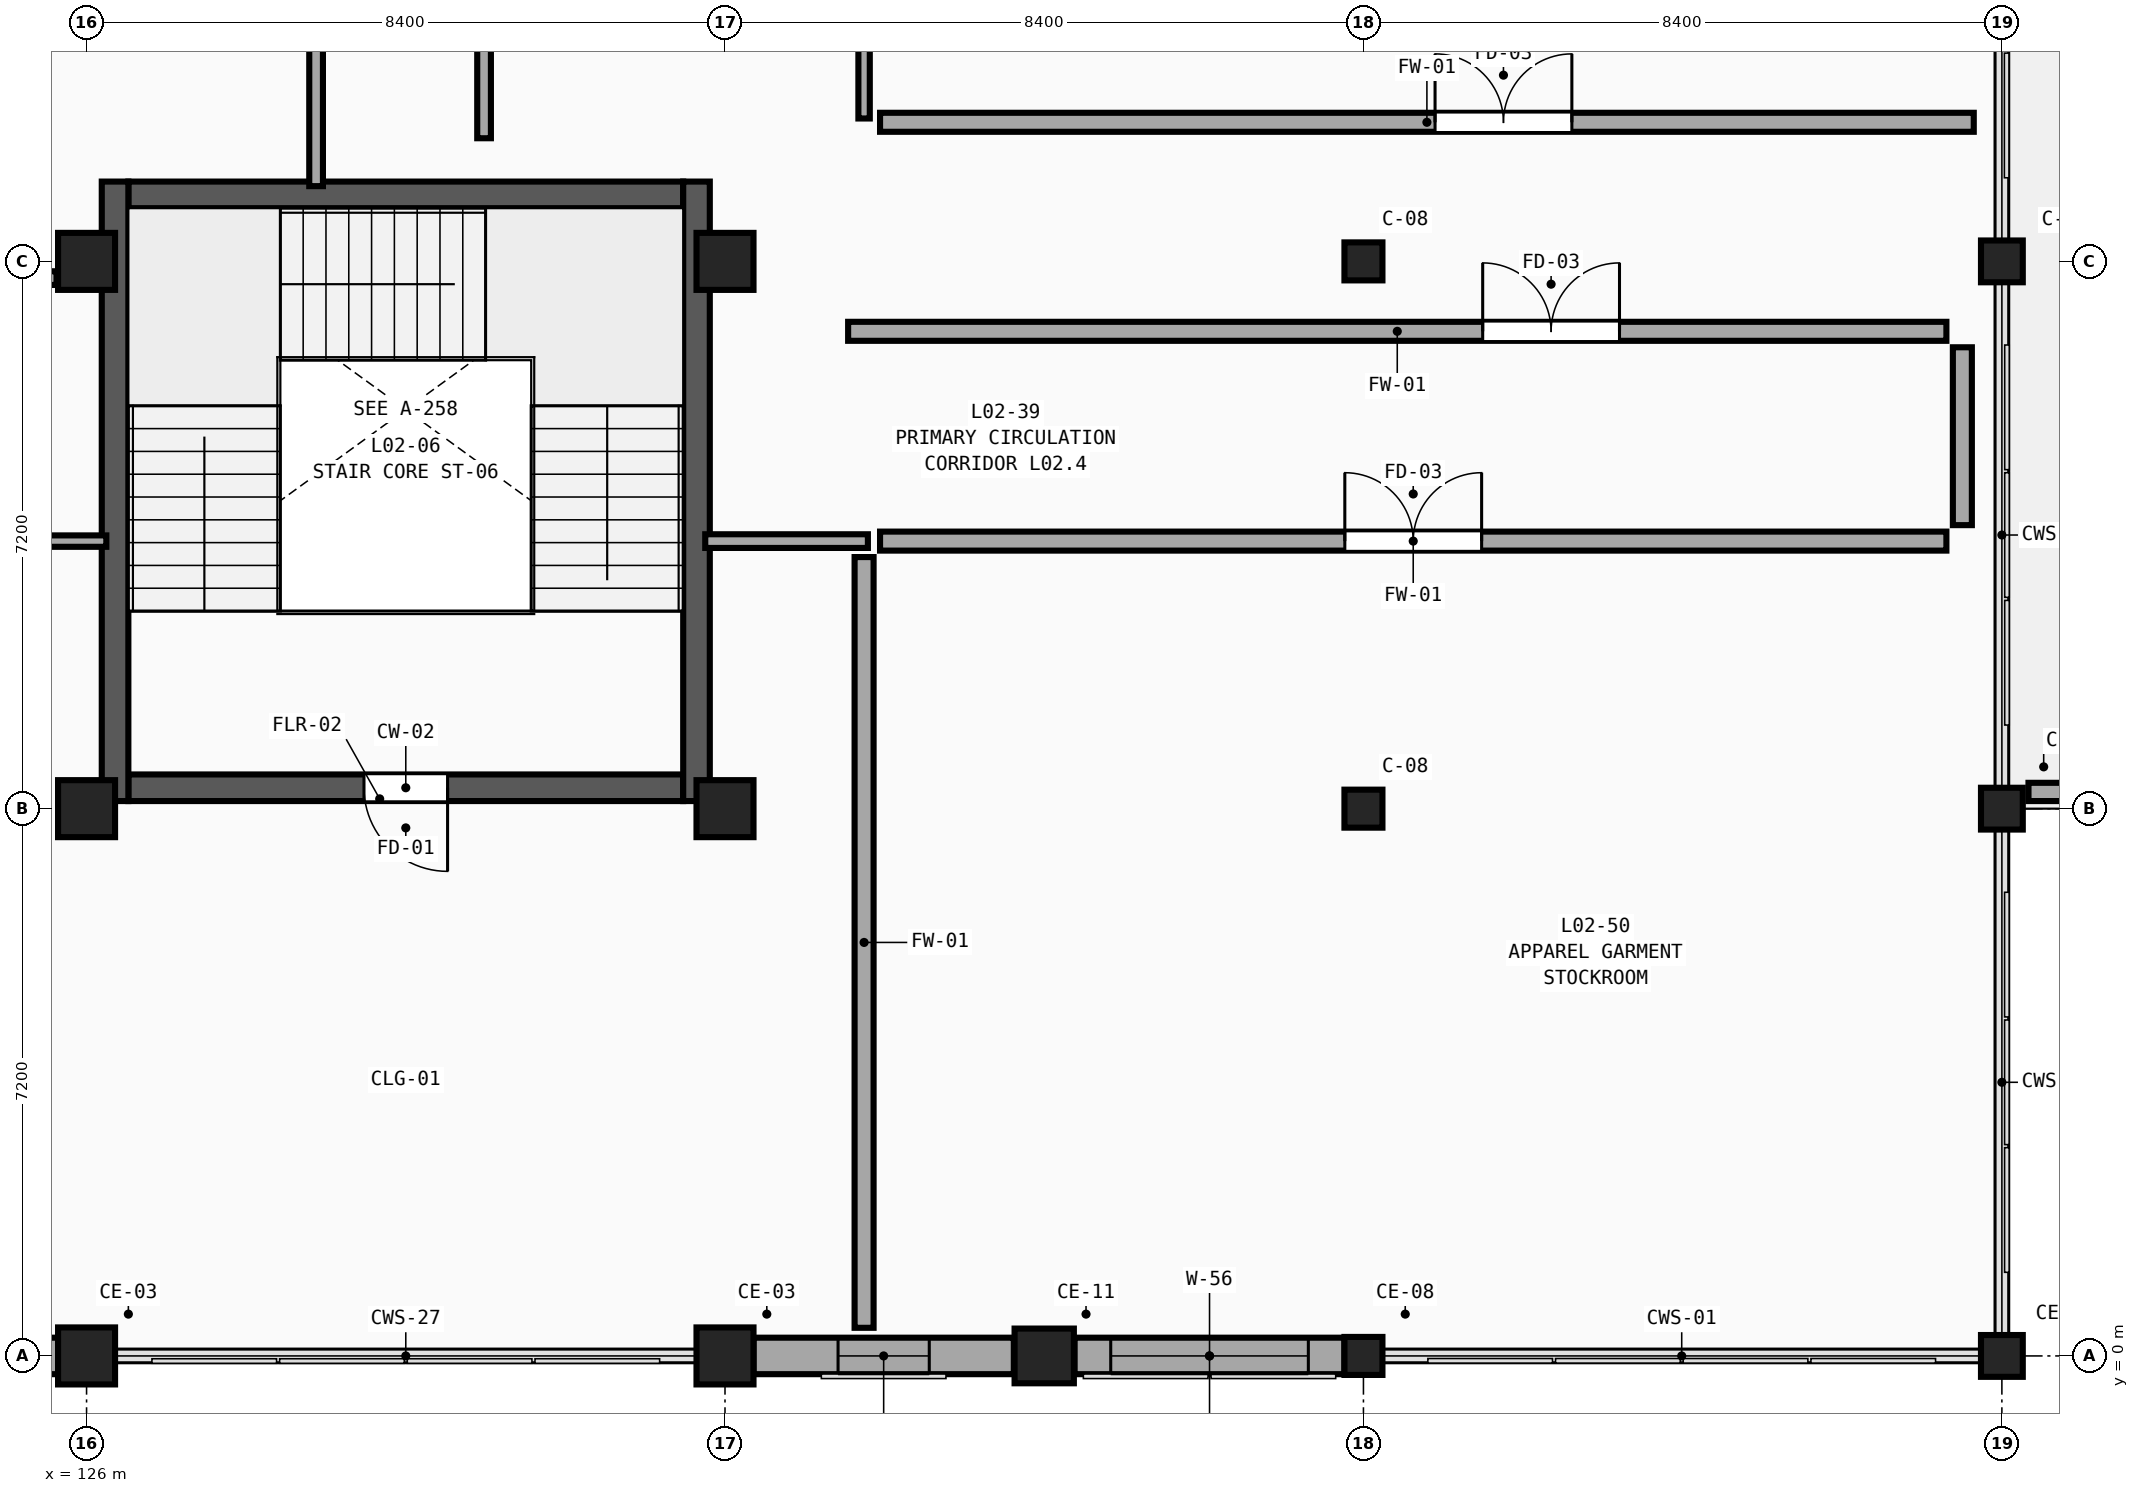
"""IFC4 building model, lengths in metres.
Left out: names, types, materials, properties, quantities, classifications, styles, units other than length and angle.
Written with IfcOpenShell. Run it as: python <this file> out.ifc"""

import sys

from ifc_helpers import new_model, si_unit, direction, frame, frame_2d, origin, origin_2d, place, context, subcontext, project, spatial, rectangle, extrude, element, fill, save


model = new_model("IFC4")
c1 = context("Model", 3, precision=1e-05, world=origin(), true_north=direction((0.0, 1.0)))
c2 = subcontext(c1, "Body", "Model", "MODEL_VIEW")
j1 = project(units=[si_unit("LENGTHUNIT", "METRE"), si_unit("PLANEANGLEUNIT", "RADIAN")], contexts=[c1])
p1 = place(None, origin())
s1 = spatial("IfcSite", under=j1, at=p1, CompositionType="ELEMENT")
p2 = place(p1, origin())
s2 = spatial("IfcBuilding", under=s1, at=p2, CompositionType="ELEMENT")
p3 = place(p2, frame((0.0, 0.0, 9.9)))
s3 = spatial("IfcBuildingStorey", under=s2, at=p3, CompositionType="ELEMENT", Elevation=9.9)
for number, where, z_axis, x_axis in (
    (1, (126.0, 0.0, 0.0), (0.0, 0.0, 1.0), (1.0, 0.0, 0.0)),
    (2, (126.0, 7.2, 0.0), (0.0, 0.0, 1.0), (1.0, 0.0, 0.0)),
    (3, (126.0, 14.4, 0.0), (0.0, 0.0, 1.0), (1.0, 0.0, 0.0)),
    (4, (134.4, 0.0, 0.0), (0.0, 0.0, 1.0), (1.0, 0.0, 0.0)),
    (5, (134.4, 7.2, 0.0), (0.0, 0.0, 1.0), (1.0, 0.0, 0.0)),
    (6, (134.4, 14.4, 0.0), (0.0, 0.0, 1.0), (1.0, 0.0, 0.0)),
):
    element("IfcColumn", number, at=place(p3, frame(where, z_axis=z_axis, x_axis=x_axis)), inside=s3, PredefinedType="COLUMN", context=c2, shape_type="SweptSolid", body=[
        extrude(rectangle(XDim=0.75, YDim=0.75, at=origin_2d()), origin(), (0.0, 0.0, 1.0), 4.5),
    ])
for number, where, z_axis, x_axis in (
    (7, (142.8, 0.0, 0.0), (0.0, 0.0, 1.0), (1.0, 0.0, 0.0)),
    (8, (142.8, 7.2, 0.0), (0.0, 0.0, 1.0), (1.0, 0.0, 0.0)),
    (9, (142.8, 14.4, 0.0), (0.0, 0.0, 1.0), (1.0, 0.0, 0.0)),
):
    element("IfcColumn", number, at=place(p3, frame(where, z_axis=z_axis, x_axis=x_axis)), inside=s3, PredefinedType="COLUMN", context=c2, shape_type="SweptSolid", body=[
        extrude(rectangle(XDim=0.5, YDim=0.5, at=origin_2d()), origin(), (0.0, 0.0, 1.0), 4.5),
    ])
for number, where, z_axis, x_axis in (
    (10, (151.2, 0.0, 0.0), (0.0, 0.0, 1.0), (1.0, 0.0, 0.0)),
    (11, (151.2, 7.2, 0.0), (0.0, 0.0, 1.0), (1.0, 0.0, 0.0)),
    (12, (151.2, 14.4, 0.0), (0.0, 0.0, 1.0), (1.0, 0.0, 0.0)),
):
    element("IfcColumn", number, at=place(p3, frame(where, z_axis=z_axis, x_axis=x_axis)), inside=s3, PredefinedType="COLUMN", context=c2, shape_type="SweptSolid", body=[
        extrude(rectangle(XDim=0.55, YDim=0.55, at=origin_2d()), origin(), (0.0, 0.0, 1.0), 4.5),
    ])
p4 = place(p3, frame((138.6, 0.0, 0.0), z_axis=(0.0, 0.0, 1.0), x_axis=(1.0, 0.0, 0.0)))
e13 = element("IfcColumn", 13, at=p4, inside=s3, PredefinedType="PILASTER", context=c2, shape_type="SweptSolid", body=[
    extrude(rectangle(XDim=0.78, YDim=0.72, at=origin_2d()), origin(), (0.0, 0.0, 1.0), 4.5),
])
p5 = place(p3, frame((125.625, 0.0, 0.0), z_axis=(0.0, 0.0, 1.0), x_axis=(-1.0, 0.0, 0.0)))
e14 = element("IfcWall", 14, at=p5, inside=s3, PredefinedType="SOLIDWALL", context=c2, shape_type="SweptSolid", body=[
    extrude(rectangle(XDim=3.425, YDim=0.48, at=frame_2d((1.712, 0.0))), origin(), (0.0, 0.0, 1.0), 3.63),
])
p6 = place(p5, frame((0.812, 0.0, 0.75)))
e15 = element("IfcOpeningElement", 15, at=p6, cuts=e14, PredefinedType="OPENING", context=c2, shape_type="SweptSolid", body=[
    extrude(rectangle(XDim=1.8, YDim=2.73, at=frame_2d((0.9, 1.365))), frame((0.0, 0.26, 0.0), z_axis=(0.0, -1.0, 0.0), x_axis=(1.0, 0.0, 0.0)), (0.0, 0.0, 1.0), 0.52),
])
p7 = place(p3, frame((142.55, 0.0, 0.0), z_axis=(0.0, 0.0, 1.0), x_axis=(-1.0, 0.0, 0.0)))
e16 = element("IfcWall", 16, at=p7, inside=s3, PredefinedType="SOLIDWALL", context=c2, shape_type="SweptSolid", body=[
    extrude(rectangle(XDim=3.55, YDim=0.48, at=frame_2d((1.775, 0.0))), origin(), (0.0, 0.0, 1.0), 3.63),
])
p8 = place(p7, frame((0.475, 0.0, 0.75)))
e17 = element("IfcOpeningElement", 17, at=p8, cuts=e16, PredefinedType="OPENING", context=c2, shape_type="SweptSolid", body=[
    extrude(rectangle(XDim=2.6, YDim=2.73, at=frame_2d((1.3, 1.365))), frame((0.0, 0.26, 0.0), z_axis=(0.0, -1.0, 0.0), x_axis=(1.0, 0.0, 0.0)), (0.0, 0.0, 1.0), 0.52),
])
p9 = place(p3, frame((138.2, 0.0, 0.0), z_axis=(0.0, 0.0, 1.0), x_axis=(-1.0, 0.0, 0.0)))
e18 = element("IfcWall", 18, at=p9, inside=s3, PredefinedType="SOLIDWALL", context=c2, shape_type="SweptSolid", body=[
    extrude(rectangle(XDim=3.425, YDim=0.48, at=frame_2d((1.712, 0.0))), origin(), (0.0, 0.0, 1.0), 3.63),
])
p10 = place(p9, frame((1.113, 0.0, 0.75)))
e19 = element("IfcOpeningElement", 19, at=p10, cuts=e18, PredefinedType="OPENING", context=c2, shape_type="SweptSolid", body=[
    extrude(rectangle(XDim=1.2, YDim=1.9, at=frame_2d((0.6, 0.95))), frame((0.0, 0.26, 0.0), z_axis=(0.0, -1.0, 0.0), x_axis=(1.0, 0.0, 0.0)), (0.0, 0.0, 1.0), 0.52),
])
p11 = place(p3, frame((167.65, 7.42, 0.0), z_axis=(0.0, 0.0, 1.0), x_axis=(-1.0, 0.0, 0.0)))
e20 = element("IfcWall", 20, at=p11, inside=s3, PredefinedType="PARAPET", context=c2, shape_type="SweptSolid", body=[
    extrude(rectangle(XDim=16.1, YDim=0.24, at=frame_2d((8.05, 0.0))), origin(), (0.0, 0.0, 1.0), 1.15),
])
p12 = place(p3, frame((133.85, 7.475, 0.0), z_axis=(0.0, 0.0, 1.0), x_axis=(-1.0, 0.0, 0.0)))
e21 = element("IfcWall", 21, at=p12, inside=s3, PredefinedType="SHEAR", context=c2, shape_type="SweptSolid", body=[
    extrude(rectangle(XDim=7.3, YDim=0.35, at=frame_2d((3.65, 0.0))), origin(), (0.0, 0.0, 1.0), 4.5),
])
p13 = place(p12, frame((3.1, 0.0, 0.0)))
e22 = element("IfcOpeningElement", 22, at=p13, cuts=e21, PredefinedType="OPENING", context=c2, shape_type="SweptSolid", body=[
    extrude(rectangle(XDim=1.1, YDim=2.2, at=frame_2d((0.55, 1.1))), frame((0.0, 0.195, 0.0), z_axis=(0.0, -1.0, 0.0), x_axis=(1.0, 0.0, 0.0)), (0.0, 0.0, 1.0), 0.39),
])
p14 = place(p3, frame((126.55, 15.275, 0.0), z_axis=(0.0, 0.0, 1.0), x_axis=(1.0, 0.0, 0.0)))
e23 = element("IfcWall", 23, at=p14, inside=s3, PredefinedType="SHEAR", context=c2, shape_type="SweptSolid", body=[
    extrude(rectangle(XDim=7.3, YDim=0.35, at=frame_2d((3.65, 0.0))), origin(), (0.0, 0.0, 1.0), 4.5),
])
for number, where, z_axis, x_axis in (
    (24, (126.375, 15.45, 0.0), (0.0, 0.0, 1.0), (0.0, -1.0, 0.0)),
    (25, (134.025, 7.3, 0.0), (0.0, 0.0, 1.0), (0.0, 1.0, 0.0)),
):
    element("IfcWall", number, at=place(p3, frame(where, z_axis=z_axis, x_axis=x_axis)), inside=s3, PredefinedType="SHEAR", context=c2, shape_type="SweptSolid", body=[
        extrude(rectangle(XDim=8.15, YDim=0.35, at=frame_2d((4.075, 0.0))), origin(), (0.0, 0.0, 1.0), 4.5),
    ])
p15 = place(p3, frame((136.02, 13.48, 0.0), z_axis=(0.0, 0.0, 1.0), x_axis=(1.0, 0.0, 0.0)))
e26 = element("IfcWall", 26, at=p15, inside=s3, PredefinedType="SOLIDWALL", context=c2, shape_type="SweptSolid", body=[
    extrude(rectangle(XDim=14.45, YDim=0.25, at=frame_2d((7.225, 0.0))), origin(), (0.0, 0.0, 1.0), 4.18),
])
p16 = place(p15, frame((8.349, 0.0, 0.0)))
e27 = element("IfcOpeningElement", 27, at=p16, cuts=e26, PredefinedType="OPENING", context=c2, shape_type="SweptSolid", body=[
    extrude(rectangle(XDim=1.8, YDim=2.3, at=frame_2d((0.9, 1.15))), frame((0.0, 0.145, 0.0), z_axis=(0.0, -1.0, 0.0), x_axis=(1.0, 0.0, 0.0)), (0.0, 0.0, 1.0), 0.29),
])
p17 = place(p3, frame((136.44, 10.72, 0.0), z_axis=(0.0, 0.0, 1.0), x_axis=(1.0, 0.0, 0.0)))
e28 = element("IfcWall", 28, at=p17, inside=s3, PredefinedType="SOLIDWALL", context=c2, shape_type="SweptSolid", body=[
    extrude(rectangle(XDim=14.03, YDim=0.25, at=frame_2d((7.015, 0.0))), origin(), (0.0, 0.0, 1.0), 4.18),
])
p18 = place(p17, frame((6.115, 0.0, 0.0)))
e29 = element("IfcOpeningElement", 29, at=p18, cuts=e28, PredefinedType="OPENING", context=c2, shape_type="SweptSolid", body=[
    extrude(rectangle(XDim=1.8, YDim=2.3, at=frame_2d((0.9, 1.15))), frame((0.0, 0.145, 0.0), z_axis=(0.0, -1.0, 0.0), x_axis=(1.0, 0.0, 0.0)), (0.0, 0.0, 1.0), 0.29),
])
p19 = place(p3, frame((117.995, 14.18, 0.0), z_axis=(0.0, 0.0, 1.0), x_axis=(1.0, 0.0, 0.0)))
e30 = element("IfcWall", 30, at=p19, inside=s3, PredefinedType="PARTITIONING", context=c2, shape_type="SweptSolid", body=[
    extrude(rectangle(XDim=7.61, YDim=0.18, at=frame_2d((3.805, 0.0))), origin(), (0.0, 0.0, 1.0), 3.73),
])
p20 = place(p19, frame((3.285, 0.0, 0.0)))
e31 = element("IfcOpeningElement", 31, at=p20, cuts=e30, PredefinedType="OPENING", context=c2, shape_type="SweptSolid", body=[
    extrude(rectangle(XDim=1.04, YDim=2.45, at=frame_2d((0.52, 1.225))), frame((0.0, 0.11, 0.0), z_axis=(0.0, -1.0, 0.0), x_axis=(1.0, 0.0, 0.0)), (0.0, 0.0, 1.0), 0.22),
])
p21 = place(p3, frame((116.14, 10.72, 0.0), z_axis=(0.0, 0.0, 1.0), x_axis=(1.0, 0.0, 0.0)))
e32 = element("IfcWall", 32, at=p21, inside=s3, PredefinedType="PARTITIONING", context=c2, shape_type="SweptSolid", body=[
    extrude(rectangle(XDim=10.12, YDim=0.15, at=frame_2d((5.06, 0.0))), origin(), (0.0, 0.0, 1.0), 4.18),
])
p22 = place(p21, frame((4.46, 0.0, 0.0)))
e33 = element("IfcOpeningElement", 33, at=p22, cuts=e32, PredefinedType="OPENING", context=c2, shape_type="SweptSolid", body=[
    extrude(rectangle(XDim=1.2, YDim=2.21, at=frame_2d((0.6, 1.105))), frame((0.0, 0.095, 0.0), z_axis=(0.0, -1.0, 0.0), x_axis=(1.0, 0.0, 0.0)), (0.0, 0.0, 1.0), 0.19),
])
p23 = place(p3, frame((129.02, 15.39, 0.0), z_axis=(0.0, 0.0, 1.0), x_axis=(0.0, 1.0, 0.0)))
e34 = element("IfcWall", 34, at=p23, inside=s3, PredefinedType="PARTITIONING", context=c2, shape_type="SweptSolid", body=[
    extrude(rectangle(XDim=9.47, YDim=0.18, at=frame_2d((4.735, 0.0))), origin(), (0.0, 0.0, 1.0), 4.18),
])
p24 = place(p23, frame((4.215, 0.0, 0.0)))
e35 = element("IfcOpeningElement", 35, at=p24, cuts=e34, PredefinedType="OPENING", context=c2, shape_type="SweptSolid", body=[
    extrude(rectangle(XDim=1.04, YDim=2.29, at=frame_2d((0.52, 1.145))), frame((0.0, 0.11, 0.0), z_axis=(0.0, -1.0, 0.0), x_axis=(1.0, 0.0, 0.0)), (0.0, 0.0, 1.0), 0.22),
])
p25 = place(p3, frame((131.23, 16.02, 0.0), z_axis=(0.0, 0.0, 1.0), x_axis=(0.0, 1.0, 0.0)))
e36 = element("IfcWall", 36, at=p25, inside=s3, PredefinedType="PARTITIONING", context=c2, shape_type="SweptSolid", body=[
    extrude(rectangle(XDim=9.0, YDim=0.18, at=frame_2d((4.5, 0.0))), origin(), (0.0, 0.0, 1.0), 4.18),
])
p26 = place(p25, frame((3.98, 0.0, 0.0)))
e37 = element("IfcOpeningElement", 37, at=p26, cuts=e36, PredefinedType="OPENING", context=c2, shape_type="SweptSolid", body=[
    extrude(rectangle(XDim=1.04, YDim=2.37, at=frame_2d((0.52, 1.185))), frame((0.0, 0.11, 0.0), z_axis=(0.0, -1.0, 0.0), x_axis=(1.0, 0.0, 0.0)), (0.0, 0.0, 1.0), 0.22),
])
p27 = place(p3, frame((150.68, 10.93, 0.0), z_axis=(0.0, 0.0, 1.0), x_axis=(0.0, 1.0, 0.0)))
e38 = element("IfcWall", 38, at=p27, inside=s3, PredefinedType="SOLIDWALL", context=c2, shape_type="SweptSolid", body=[
    extrude(rectangle(XDim=2.34, YDim=0.25, at=frame_2d((1.17, 0.0))), origin(), (0.0, 0.0, 1.0), 3.63),
])
p28 = place(p3, frame((134.14, 10.72, 0.0), z_axis=(0.0, 0.0, 1.0), x_axis=(1.0, 0.0, 0.0)))
e39 = element("IfcWall", 39, at=p28, inside=s3, PredefinedType="PARTITIONING", context=c2, shape_type="SweptSolid", body=[
    extrude(rectangle(XDim=2.14, YDim=0.18, at=frame_2d((1.07, 0.0))), origin(), (0.0, 0.0, 1.0), 4.18),
])
p29 = place(p3, frame((136.44, 16.23, 0.0), z_axis=(0.0, 0.0, 1.0), x_axis=(1.0, 0.0, 0.0)))
e40 = element("IfcWall", 40, at=p29, inside=s3, PredefinedType="SOLIDWALL", context=c2, shape_type="SweptSolid", body=[
    extrude(rectangle(XDim=14.39, YDim=0.25, at=frame_2d((7.195, 0.0))), origin(), (0.0, 0.0, 1.0), 4.18),
])
p30 = place(p29, frame((7.302, 0.0, 0.0)))
e41 = element("IfcOpeningElement", 41, at=p30, cuts=e40, PredefinedType="OPENING", context=c2, shape_type="SweptSolid", body=[
    extrude(rectangle(XDim=1.8, YDim=2.3, at=frame_2d((0.9, 1.15))), frame((0.0, 0.145, 0.0), z_axis=(0.0, -1.0, 0.0), x_axis=(1.0, 0.0, 0.0)), (0.0, 0.0, 1.0), 0.29),
])
p31 = place(p3, frame((136.23, 16.28, 0.0), z_axis=(0.0, 0.0, 1.0), x_axis=(0.0, 1.0, 0.0)))
e42 = element("IfcWall", 42, at=p31, inside=s3, PredefinedType="PARTITIONING", context=c2, shape_type="SweptSolid", body=[
    extrude(rectangle(XDim=12.15, YDim=0.15, at=frame_2d((6.075, 0.0))), origin(), (0.0, 0.0, 1.0), 4.18),
])
p32 = place(p3, frame((136.23, 0.37, 0.0), z_axis=(0.0, 0.0, 1.0), x_axis=(0.0, 1.0, 0.0)))
e43 = element("IfcWall", 43, at=p32, inside=s3, PredefinedType="SOLIDWALL", context=c2, shape_type="SweptSolid", body=[
    extrude(rectangle(XDim=10.14, YDim=0.25, at=frame_2d((5.07, 0.0))), origin(), (0.0, 0.0, 1.0), 4.18),
])
p33 = place(p8, origin())
e44 = element("IfcWindow", 44, at=p33, inside=s3, PartitioningType="TRIPLE_PANEL_VERTICAL", PredefinedType="WINDOW", context=c2, shape_type="SweptSolid", body=[
    extrude(rectangle(XDim=2.6, YDim=2.73, at=frame_2d((1.3, 1.365))), frame((0.0, 0.03, 0.0), z_axis=(0.0, -1.0, 0.0), x_axis=(1.0, 0.0, 0.0)), (0.0, 0.0, 1.0), 0.06),
])
fill(e17, e44)
p34 = place(p10, origin())
e45 = element("IfcWindow", 45, at=p34, inside=s3, PartitioningType="SINGLE_PANEL", PredefinedType="WINDOW", context=c2, shape_type="SweptSolid", body=[
    extrude(rectangle(XDim=1.2, YDim=1.9, at=frame_2d((0.6, 0.95))), frame((0.0, 0.03, 0.0), z_axis=(0.0, -1.0, 0.0), x_axis=(1.0, 0.0, 0.0)), (0.0, 0.0, 1.0), 0.06),
])
fill(e19, e45)
p35 = place(p13, origin())
e46 = element("IfcDoor", 46, at=p35, inside=s3, OperationType="SINGLE_SWING_LEFT", PredefinedType="DOOR", context=c2, shape_type="SweptSolid", body=[
    extrude(rectangle(XDim=1.1, YDim=2.2, at=frame_2d((0.55, 1.1))), frame((0.0, 0.025, 0.0), z_axis=(0.0, -1.0, 0.0), x_axis=(1.0, 0.0, 0.0)), (0.0, 0.0, 1.0), 0.05),
])
fill(e22, e46)
p36 = place(p16, origin())
e47 = element("IfcDoor", 47, at=p36, inside=s3, OperationType="DOUBLE_DOOR_SINGLE_SWING", PredefinedType="DOOR", context=c2, shape_type="SweptSolid", body=[
    extrude(rectangle(XDim=1.8, YDim=2.3, at=frame_2d((0.9, 1.15))), frame((0.0, 0.025, 0.0), z_axis=(0.0, -1.0, 0.0), x_axis=(1.0, 0.0, 0.0)), (0.0, 0.0, 1.0), 0.05),
])
fill(e27, e47)
p37 = place(p18, origin())
e48 = element("IfcDoor", 48, at=p37, inside=s3, OperationType="DOUBLE_DOOR_SINGLE_SWING", PredefinedType="DOOR", context=c2, shape_type="SweptSolid", body=[
    extrude(rectangle(XDim=1.8, YDim=2.3, at=frame_2d((0.9, 1.15))), frame((0.0, 0.025, 0.0), z_axis=(0.0, -1.0, 0.0), x_axis=(1.0, 0.0, 0.0)), (0.0, 0.0, 1.0), 0.05),
])
fill(e29, e48)
p38 = place(p30, origin())
e49 = element("IfcDoor", 49, at=p38, inside=s3, OperationType="DOUBLE_DOOR_SINGLE_SWING", PredefinedType="DOOR", context=c2, shape_type="SweptSolid", body=[
    extrude(rectangle(XDim=1.8, YDim=2.3, at=frame_2d((0.9, 1.15))), frame((0.0, 0.025, 0.0), z_axis=(0.0, -1.0, 0.0), x_axis=(1.0, 0.0, 0.0)), (0.0, 0.0, 1.0), 0.05),
])
fill(e41, e49)
save(model, sys.argv[1])
